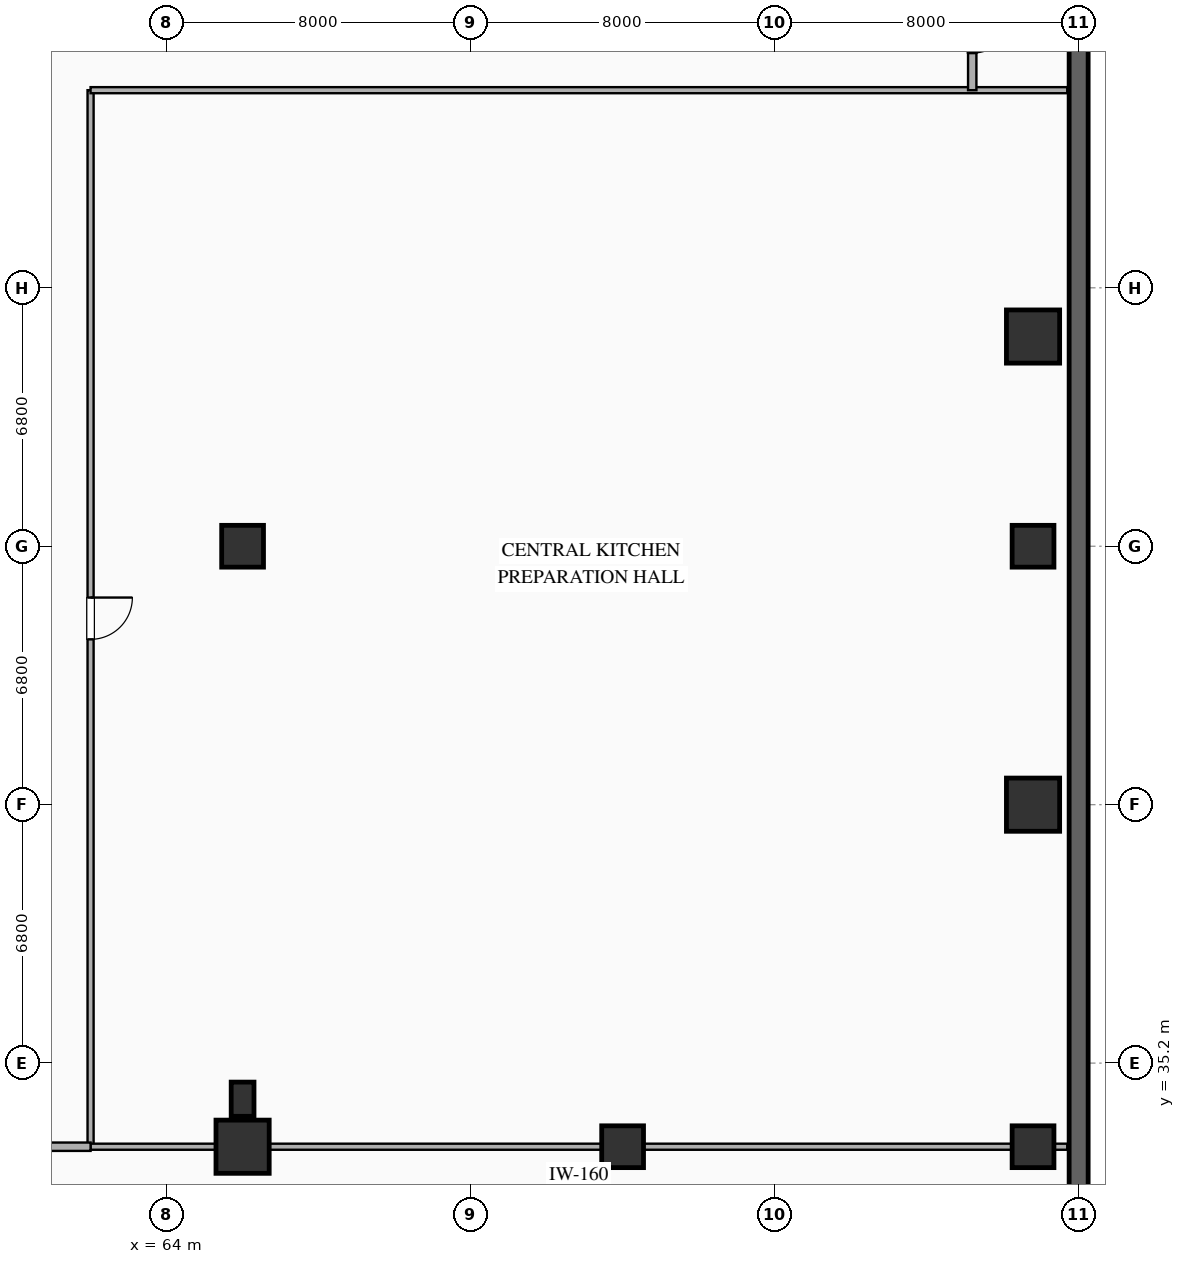
"""IFC4 building model, lengths in metres.
Left out: names, types, materials, properties, quantities, classifications, styles, units other than length and angle.
Written with IfcOpenShell. Run it as: python <this file> out.ifc"""

import sys

from ifc_helpers import new_model, si_unit, direction, frame, frame_2d, origin, origin_2d, place, context, subcontext, project, spatial, rectangle, extrude, element, fill, save


model = new_model("IFC4")
c1 = context("Model", 3, precision=1e-05, world=origin(), true_north=direction((0.0, 1.0)))
c2 = subcontext(c1, "Body", "Model", "MODEL_VIEW")
j1 = project(units=[si_unit("LENGTHUNIT", "METRE"), si_unit("PLANEANGLEUNIT", "RADIAN")], contexts=[c1])
p1 = place(None, origin())
s1 = spatial("IfcSite", under=j1, at=p1, CompositionType="ELEMENT")
p2 = place(p1, origin())
s2 = spatial("IfcBuilding", under=s1, at=p2, CompositionType="ELEMENT")
p3 = place(p2, frame((0.0, 0.0, -4.5)))
s3 = spatial("IfcBuildingStorey", under=s2, at=p3, CompositionType="ELEMENT", Elevation=-4.5)
p4 = place(p3, frame((88.0, 8.0, 0.0), z_axis=(0.0, 0.0, 1.0), x_axis=(0.0, 1.0, 0.0)))
e1 = element("IfcWall", 1, at=p4, inside=s3, PredefinedType="SOLIDWALL", context=c2, shape_type="SweptSolid", body=[
    extrude(rectangle(XDim=68.0, YDim=0.5, at=frame_2d((34.0, 0.0))), origin(), (0.0, 0.0, 1.0), 4.22),
])
for number, where, z_axis, x_axis in (
    (2, (86.8, 33.0, 0.0), (0.0, 0.0, 1.0), (1.0, 0.0, 0.0)),
    (3, (86.8, 48.8, 0.0), (0.0, 0.0, 1.0), (1.0, 0.0, 0.0)),
):
    element("IfcColumn", number, at=place(p3, frame(where, z_axis=z_axis, x_axis=x_axis)), inside=s3, PredefinedType="COLUMN", context=c2, shape_type="SweptSolid", body=[
        extrude(rectangle(XDim=1.1, YDim=1.1, at=origin_2d()), origin(), (0.0, 0.0, 1.0), 4.22),
    ])
p5 = place(p3, frame((66.0, 33.0, 0.0), z_axis=(0.0, 0.0, 1.0), x_axis=(1.0, 0.0, 0.0)))
e4 = element("IfcColumn", 4, at=p5, inside=s3, PredefinedType="COLUMN", context=c2, shape_type="SweptSolid", body=[
    extrude(rectangle(XDim=1.4, YDim=1.4, at=origin_2d()), origin(), (0.0, 0.0, 1.0), 4.22),
])
for number, where, z_axis, x_axis in (
    (5, (76.0, 33.0, 0.0), (0.0, 0.0, 1.0), (1.0, 0.0, 0.0)),
    (6, (66.0, 48.8, 0.0), (0.0, 0.0, 1.0), (1.0, 0.0, 0.0)),
):
    element("IfcColumn", number, at=place(p3, frame(where, z_axis=z_axis, x_axis=x_axis)), inside=s3, PredefinedType="COLUMN", context=c2, shape_type="SweptSolid", body=[
        extrude(rectangle(XDim=1.1, YDim=1.1, at=origin_2d()), origin(), (0.0, 0.0, 1.0), 4.22),
    ])
for number, where, z_axis, x_axis in (
    (7, (86.8, 42.0, 0.0), (0.0, 0.0, 1.0), (1.0, 0.0, 0.0)),
    (8, (86.8, 54.318, 0.0), (0.0, 0.0, 1.0), (1.0, 0.0, 0.0)),
):
    element("IfcColumn", number, at=place(p3, frame(where, z_axis=z_axis, x_axis=x_axis)), inside=s3, PredefinedType="COLUMN", context=c2, shape_type="SweptSolid", body=[
        extrude(rectangle(XDim=1.4, YDim=1.4, at=origin_2d()), origin(), (0.0, 0.0, 1.0), 4.22),
    ])
p6 = place(p3, frame((66.0, 34.25, 0.0), z_axis=(0.0, 0.0, 1.0), x_axis=(1.0, 0.0, 0.0)))
e9 = element("IfcColumn", 9, at=p6, inside=s3, PredefinedType="PILASTER", context=c2, shape_type="SweptSolid", body=[
    extrude(rectangle(XDim=0.6, YDim=0.9, at=origin_2d()), origin(), (0.0, 0.0, 1.0), 4.22),
])
p7 = place(p3, frame((62.0, 60.8, 0.0), z_axis=(0.0, 0.0, 1.0), x_axis=(0.0, -1.0, 0.0)))
e10 = element("IfcWall", 10, at=p7, inside=s3, PredefinedType="PLUMBINGWALL", context=c2, shape_type="SweptSolid", body=[
    extrude(rectangle(XDim=27.8, YDim=0.16, at=frame_2d((13.9, 0.0))), origin(), (0.0, 0.0, 1.0), 3.42),
])
p8 = place(p7, frame((13.35, 0.0, 0.0)))
e11 = element("IfcOpeningElement", 11, at=p8, cuts=e10, PredefinedType="OPENING", context=c2, shape_type="SweptSolid", body=[
    extrude(rectangle(XDim=1.1, YDim=2.2, at=frame_2d((0.55, 1.1))), frame((0.0, 0.09, 0.0), z_axis=(0.0, -1.0, 0.0), x_axis=(1.0, 0.0, 0.0)), (0.0, 0.0, 1.0), 0.18),
])
for number, where, z_axis, x_axis in (
    (12, (87.7, 33.0, 0.0), (0.0, 0.0, 1.0), (-1.0, 0.0, 0.0)),
    (13, (87.7, 60.8, 0.0), (0.0, 0.0, 1.0), (-1.0, 0.0, 0.0)),
):
    element("IfcWall", number, at=place(p3, frame(where, z_axis=z_axis, x_axis=x_axis)), inside=s3, PredefinedType="PLUMBINGWALL", context=c2, shape_type="SweptSolid", body=[
        extrude(rectangle(XDim=25.7, YDim=0.16, at=frame_2d((12.85, 0.0))), origin(), (0.0, 0.0, 1.0), 3.42),
    ])
p9 = place(p3, frame((62.0, 33.0, 0.0), z_axis=(0.0, 0.0, 1.0), x_axis=(-1.0, 0.0, 0.0)))
e14 = element("IfcWall", 14, at=p9, inside=s3, PredefinedType="SOLIDWALL", context=c2, shape_type="SweptSolid", body=[
    extrude(rectangle(XDim=28.0, YDim=0.22, at=frame_2d((14.0, 0.0))), origin(), (0.0, 0.0, 1.0), 3.42),
])
p10 = place(p9, frame((20.434, 0.0, 0.0)))
e15 = element("IfcOpeningElement", 15, at=p10, cuts=e14, PredefinedType="OPENING", context=c2, shape_type="SweptSolid", body=[
    extrude(rectangle(XDim=1.1, YDim=2.2, at=frame_2d((0.55, 1.1))), frame((0.0, 0.12, 0.0), z_axis=(0.0, -1.0, 0.0), x_axis=(1.0, 0.0, 0.0)), (0.0, 0.0, 1.0), 0.24),
])
p11 = place(p9, frame((6.466, 0.0, 0.0)))
e16 = element("IfcOpeningElement", 16, at=p11, cuts=e14, PredefinedType="OPENING", context=c2, shape_type="SweptSolid", body=[
    extrude(rectangle(XDim=1.1, YDim=2.2, at=frame_2d((0.55, 1.1))), frame((0.0, 0.12, 0.0), z_axis=(0.0, -1.0, 0.0), x_axis=(1.0, 0.0, 0.0)), (0.0, 0.0, 1.0), 0.24),
])
p12 = place(p3, frame((85.2, 63.85, 0.0), z_axis=(0.0, 0.0, 1.0), x_axis=(0.0, -1.0, 0.0)))
e17 = element("IfcWall", 17, at=p12, inside=s3, PredefinedType="SOLIDWALL", context=c2, shape_type="SweptSolid", body=[
    extrude(rectangle(XDim=3.05, YDim=0.22, at=frame_2d((1.525, 0.0))), origin(), (0.0, 0.0, 1.0), 3.42),
])
p13 = place(p12, frame((0.975, 0.0, 0.0)))
e18 = element("IfcOpeningElement", 18, at=p13, cuts=e17, PredefinedType="OPENING", context=c2, shape_type="SweptSolid", body=[
    extrude(rectangle(XDim=1.1, YDim=2.2, at=frame_2d((0.55, 1.1))), frame((0.0, 0.12, 0.0), z_axis=(0.0, -1.0, 0.0), x_axis=(1.0, 0.0, 0.0)), (0.0, 0.0, 1.0), 0.24),
])
p14 = place(p8, origin())
e19 = element("IfcDoor", 19, at=p14, inside=s3, OperationType="SINGLE_SWING_LEFT", PredefinedType="DOOR", context=c2, shape_type="SweptSolid", body=[
    extrude(rectangle(XDim=1.1, YDim=2.2, at=frame_2d((0.55, 1.1))), frame((0.0, 0.025, 0.0), z_axis=(0.0, -1.0, 0.0), x_axis=(1.0, 0.0, 0.0)), (0.0, 0.0, 1.0), 0.05),
])
fill(e11, e19)
p15 = place(p13, origin())
e20 = element("IfcDoor", 20, at=p15, inside=s3, OperationType="SINGLE_SWING_LEFT", PredefinedType="DOOR", context=c2, shape_type="SweptSolid", body=[
    extrude(rectangle(XDim=1.1, YDim=2.2, at=frame_2d((0.55, 1.1))), frame((0.0, 0.025, 0.0), z_axis=(0.0, -1.0, 0.0), x_axis=(1.0, 0.0, 0.0)), (0.0, 0.0, 1.0), 0.05),
])
fill(e18, e20)
save(model, sys.argv[1])
